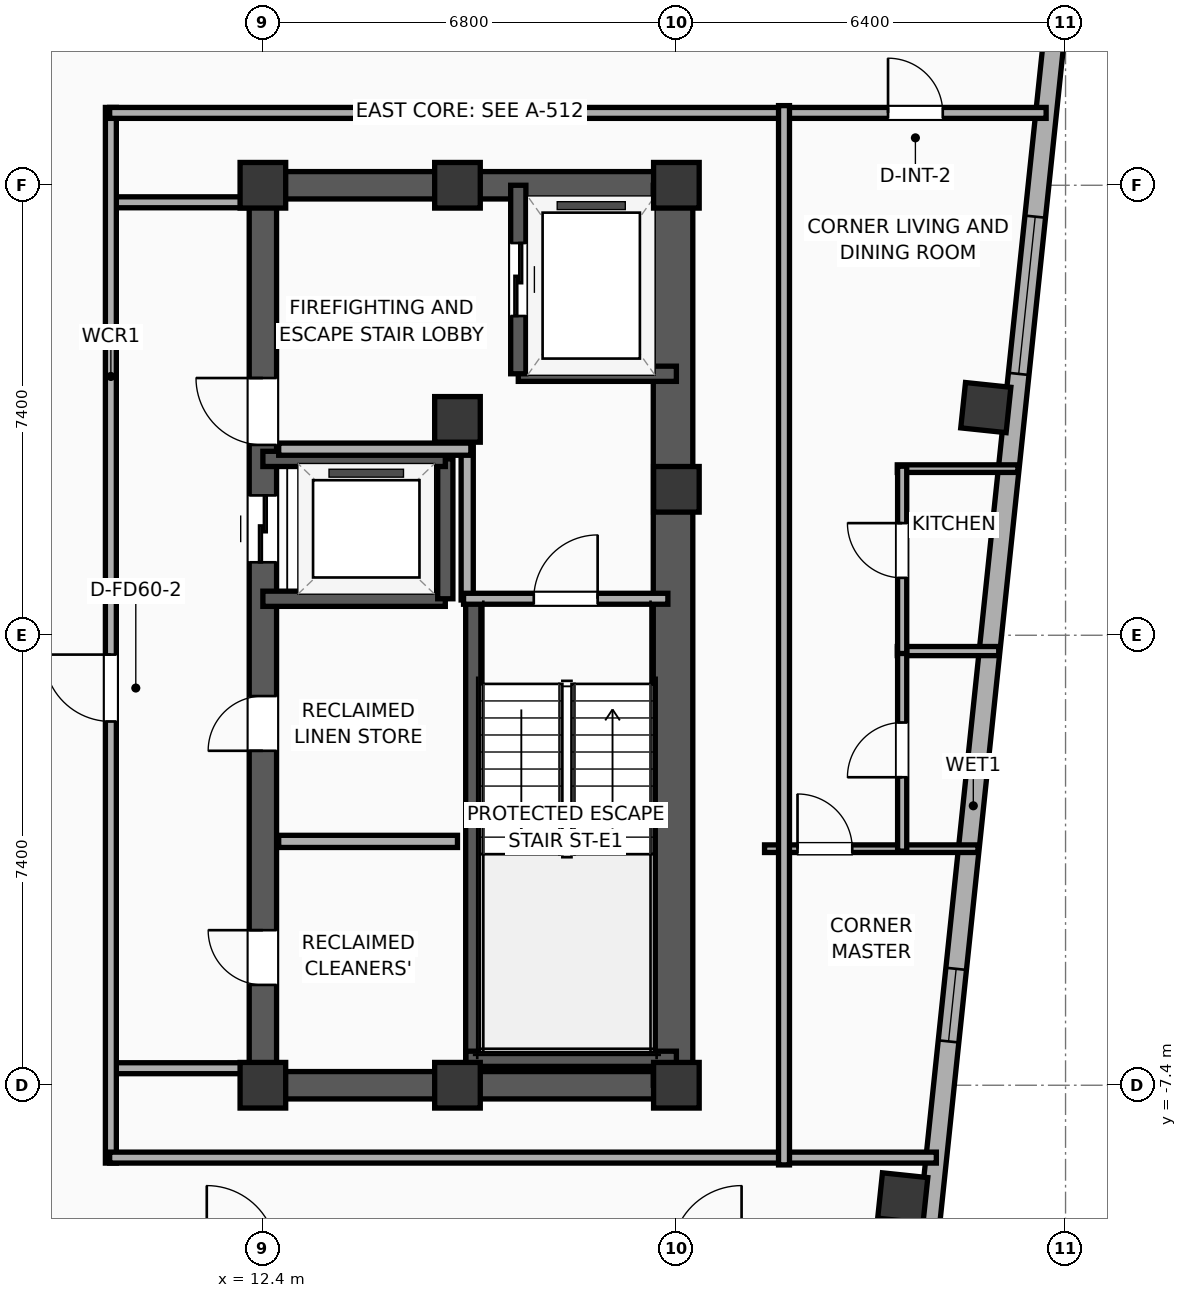
"""IFC4 building model, lengths in metres.
Left out: names, types, materials, properties, quantities, classifications, styles, units other than length and angle.
Written with IfcOpenShell. Run it as: python <this file> out.ifc"""

import sys

from ifc_helpers import new_model, si_unit, direction, frame, frame_2d, origin, origin_2d, place, context, subcontext, project, spatial, rectangle, hollow_rectangle, extrude, element, fill, save


model = new_model("IFC4")
c1 = context("Model", 3, precision=1e-05, world=origin(), true_north=direction((0.0, 1.0)))
c2 = subcontext(c1, "Body", "Model", "MODEL_VIEW")
j1 = project(units=[si_unit("LENGTHUNIT", "METRE"), si_unit("PLANEANGLEUNIT", "RADIAN")], contexts=[c1])
p1 = place(None, origin())
s1 = spatial("IfcSite", under=j1, at=p1, CompositionType="ELEMENT")
p2 = place(p1, origin())
s2 = spatial("IfcBuilding", under=s1, at=p2, CompositionType="ELEMENT")
p3 = place(p2, frame((0.0, 0.0, 295.1)))
s3 = spatial("IfcBuildingStorey", under=s2, at=p3, CompositionType="ELEMENT", Elevation=295.1)
for number, where, z_axis, x_axis in (
    (1, (12.4, -7.4, 0.0), (0.0, 0.0, 1.0), (1.0, 0.0, 0.0)),
    (2, (15.6, 3.55, 0.0), (0.0, 0.0, 1.0), (1.0, 0.0, 0.0)),
    (3, (12.4, 7.4, 0.0), (0.0, 0.0, 1.0), (1.0, 0.0, 0.0)),
    (4, (15.6, -7.4, 0.0), (0.0, 0.0, 1.0), (1.0, 0.0, 0.0)),
    (5, (15.6, 7.4, 0.0), (0.0, 0.0, 1.0), (1.0, 0.0, 0.0)),
    (6, (19.2, -7.4, 0.0), (0.0, 0.0, 1.0), (1.0, 0.0, 0.0)),
    (7, (19.2, 2.4, 0.0), (0.0, 0.0, 1.0), (1.0, 0.0, 0.0)),
    (8, (19.2, 7.4, 0.0), (0.0, 0.0, 1.0), (1.0, 0.0, 0.0)),
):
    element("IfcColumn", number, at=place(p3, frame(where, z_axis=z_axis, x_axis=x_axis)), inside=s3, PredefinedType="COLUMN", context=c2, shape_type="SweptSolid", body=[
        extrude(rectangle(XDim=0.75, YDim=0.75, at=origin_2d()), origin(), (0.0, 0.0, 1.0), 3.9),
    ])
for number, where, z_axis, x_axis in (
    (9, (12.175, -7.4, 0.0), (0.0, 0.0, 1.0), (1.0, 0.0, 0.0)),
    (10, (12.175, 7.4, 0.0), (0.0, 0.0, 1.0), (1.0, 0.0, 0.0)),
):
    element("IfcWall", number, at=place(p3, frame(where, z_axis=z_axis, x_axis=x_axis)), inside=s3, PredefinedType="SHEAR", context=c2, shape_type="SweptSolid", body=[
        extrude(rectangle(XDim=7.25, YDim=0.45, at=frame_2d((3.625, 0.0))), origin(), (0.0, 0.0, 1.0), 3.635),
    ])
p4 = place(p3, frame((12.4, -7.4, 0.0), z_axis=(0.0, 0.0, 1.0), x_axis=(0.0, 1.0, 0.0)))
e11 = element("IfcWall", 11, at=p4, inside=s3, PredefinedType="SHEAR", context=c2, shape_type="SweptSolid", body=[
    extrude(rectangle(XDim=14.8, YDim=0.45, at=frame_2d((7.4, 0.0))), origin(), (0.0, 0.0, 1.0), 3.635),
])
p5 = place(p4, frame((8.6, 0.0, 0.0)))
e12 = element("IfcOpeningElement", 12, at=p5, cuts=e11, PredefinedType="OPENING", context=c2, shape_type="SweptSolid", body=[
    extrude(rectangle(XDim=1.1, YDim=2.05, at=frame_2d((0.55, 1.025))), frame((0.0, 0.235, 0.0), z_axis=(0.0, -1.0, 0.0), x_axis=(1.0, 0.0, 0.0)), (0.0, 0.0, 1.0), 0.47),
])
p6 = place(p4, frame((10.53, 0.0, 0.0)))
e13 = element("IfcOpeningElement", 13, at=p6, cuts=e11, PredefinedType="OPENING", context=c2, shape_type="SweptSolid", body=[
    extrude(rectangle(XDim=1.1, YDim=2.05, at=frame_2d((0.55, 1.025))), frame((0.0, 0.235, 0.0), z_axis=(0.0, -1.0, 0.0), x_axis=(1.0, 0.0, 0.0)), (0.0, 0.0, 1.0), 0.47),
])
p7 = place(p4, frame((1.65, 0.0, 0.0)))
e14 = element("IfcOpeningElement", 14, at=p7, cuts=e11, PredefinedType="OPENING", context=c2, shape_type="SweptSolid", body=[
    extrude(rectangle(XDim=0.9, YDim=2.05, at=frame_2d((0.45, 1.025))), frame((0.0, 0.235, 0.0), z_axis=(0.0, -1.0, 0.0), x_axis=(1.0, 0.0, 0.0)), (0.0, 0.0, 1.0), 0.47),
])
p8 = place(p4, frame((5.5, 0.0, 0.0)))
e15 = element("IfcOpeningElement", 15, at=p8, cuts=e11, PredefinedType="OPENING", context=c2, shape_type="SweptSolid", body=[
    extrude(rectangle(XDim=0.9, YDim=2.05, at=frame_2d((0.45, 1.025))), frame((0.0, 0.235, 0.0), z_axis=(0.0, -1.0, 0.0), x_axis=(1.0, 0.0, 0.0)), (0.0, 0.0, 1.0), 0.47),
])
p9 = place(p3, frame((19.145, -7.4, 0.0), z_axis=(0.0, 0.0, 1.0), x_axis=(0.0, 1.0, 0.0)))
e16 = element("IfcWall", 16, at=p9, inside=s3, PredefinedType="SHEAR", context=c2, shape_type="SweptSolid", body=[
    extrude(rectangle(XDim=14.8, YDim=0.65, at=frame_2d((7.4, 0.0))), origin(), (0.0, 0.0, 1.0), 3.635),
])
p10 = place(p3, frame((15.86, -7.085, 0.0), z_axis=(0.0, 0.0, 1.0), x_axis=(0.0, 1.0, 0.0)))
e17 = element("IfcWall", 17, at=p10, inside=s3, PredefinedType="SOLIDWALL", context=c2, shape_type="SweptSolid", body=[
    extrude(rectangle(XDim=7.685, YDim=0.25, at=frame_2d((3.843, 0.0))), origin(), (0.0, 0.0, 1.0), 3.635),
])
p11 = place(p3, frame((15.74, -6.965, 0.0), z_axis=(0.0, 0.0, 1.0), x_axis=(1.0, 0.0, 0.0)))
e18 = element("IfcWall", 18, at=p11, inside=s3, PredefinedType="SOLIDWALL", context=c2, shape_type="SweptSolid", body=[
    extrude(rectangle(XDim=3.46, YDim=0.25, at=frame_2d((1.73, 0.0))), origin(), (0.0, 0.0, 1.0), 3.635),
])
for number, where, z_axis, x_axis in (
    (19, (22.923, -9.252, 0.0), (0.0, 0.0, 1.0), (0.995, -0.105, 0.0)),
    (20, (24.289, 3.744, 0.0), (0.0, 0.0, 1.0), (0.995, -0.105, 0.0)),
):
    element("IfcColumn", number, at=place(p3, frame(where, z_axis=z_axis, x_axis=x_axis)), inside=s3, PredefinedType="COLUMN", context=c2, shape_type="SweptSolid", body=[
        extrude(hollow_rectangle(XDim=0.75, YDim=0.75, WallThickness=0.025, at=origin_2d()), origin(), (0.0, 0.0, 1.0), 3.9),
    ])
p12 = place(p3, frame((25.67, 12.296, 0.0), z_axis=(0.0, 0.0, 1.0), x_axis=(-0.104533282919, -0.994521388791, 0.0)))
e21 = element("IfcWall", 21, at=p12, inside=s3, PredefinedType="ELEMENTEDWALL", context=c2, shape_type="SweptSolid", body=[
    extrude(rectangle(XDim=30.366, YDim=0.34, at=frame_2d((15.183, 0.0))), origin(), (0.0, 0.0, 1.0), 3.635),
])
p13 = place(p12, frame((5.442, 0.0, 0.65)))
e22 = element("IfcOpeningElement", 22, at=p13, cuts=e21, PredefinedType="OPENING", context=c2, shape_type="SweptSolid", body=[
    extrude(rectangle(XDim=2.6, YDim=2.45, at=frame_2d((1.3, 1.225))), frame((0.0, 0.18, 0.0), z_axis=(0.0, -1.0, 0.0), x_axis=(1.0, 0.0, 0.0)), (0.0, 0.0, 1.0), 0.36),
])
p14 = place(p12, frame((27.067, 0.0, 0.75)))
e23 = element("IfcOpeningElement", 23, at=p14, cuts=e21, PredefinedType="OPENING", context=c2, shape_type="SweptSolid", body=[
    extrude(rectangle(XDim=1.2, YDim=2.05, at=frame_2d((0.6, 1.025))), frame((0.0, 0.18, 0.0), z_axis=(0.0, -1.0, 0.0), x_axis=(1.0, 0.0, 0.0)), (0.0, 0.0, 1.0), 0.36),
])
p15 = place(p12, frame((17.879, 0.0, 0.75)))
e24 = element("IfcOpeningElement", 24, at=p15, cuts=e21, PredefinedType="OPENING", context=c2, shape_type="SweptSolid", body=[
    extrude(rectangle(XDim=1.2, YDim=2.05, at=frame_2d((0.6, 1.025))), frame((0.0, 0.18, 0.0), z_axis=(0.0, -1.0, 0.0), x_axis=(1.0, 0.0, 0.0)), (0.0, 0.0, 1.0), 0.36),
])
p16 = place(p3, frame((16.6, 4.3, 0.0), z_axis=(0.0, 0.0, 1.0), x_axis=(1.0, 0.0, 0.0)))
e25 = element("IfcWall", 25, at=p16, inside=s3, PredefinedType="SOLIDWALL", context=c2, shape_type="SweptSolid", body=[
    extrude(rectangle(XDim=2.6, YDim=0.25, at=frame_2d((1.3, 0.0))), origin(), (0.0, 0.0, 1.0), 3.635),
])
p17 = place(p3, frame((16.6, 7.4, 0.0), z_axis=(0.0, 0.0, 1.0), x_axis=(0.0, -1.0, 0.0)))
e26 = element("IfcWall", 26, at=p17, inside=s3, PredefinedType="SOLIDWALL", context=c2, shape_type="SweptSolid", body=[
    extrude(rectangle(XDim=3.1, YDim=0.25, at=frame_2d((1.55, 0.0))), origin(), (0.0, 0.0, 1.0), 3.635),
])
p18 = place(p17, frame((0.95, 0.0, 0.0)))
e27 = element("IfcOpeningElement", 27, at=p18, cuts=e26, PredefinedType="OPENING", context=c2, shape_type="SweptSolid", body=[
    extrude(rectangle(XDim=1.2, YDim=2.05, at=frame_2d((0.6, 1.025))), frame((0.0, 0.135, 0.0), z_axis=(0.0, -1.0, 0.0), x_axis=(1.0, 0.0, 0.0)), (0.0, 0.0, 1.0), 0.27),
])
p19 = place(p3, frame((12.4, 0.6, 0.0), z_axis=(0.0, 0.0, 1.0), x_axis=(1.0, 0.0, 0.0)))
e28 = element("IfcWall", 28, at=p19, inside=s3, PredefinedType="SOLIDWALL", context=c2, shape_type="SweptSolid", body=[
    extrude(rectangle(XDim=3.0, YDim=0.25, at=frame_2d((1.5, 0.0))), origin(), (0.0, 0.0, 1.0), 3.635),
])
p20 = place(p3, frame((15.4, 0.6, 0.0), z_axis=(0.0, 0.0, 1.0), x_axis=(0.0, 1.0, 0.0)))
e29 = element("IfcWall", 29, at=p20, inside=s3, PredefinedType="SOLIDWALL", context=c2, shape_type="SweptSolid", body=[
    extrude(rectangle(XDim=2.3, YDim=0.25, at=frame_2d((1.15, 0.0))), origin(), (0.0, 0.0, 1.0), 3.635),
])
p21 = place(p3, frame((15.4, 2.9, 0.0), z_axis=(0.0, 0.0, 1.0), x_axis=(-1.0, 0.0, 0.0)))
e30 = element("IfcWall", 30, at=p21, inside=s3, PredefinedType="SOLIDWALL", context=c2, shape_type="SweptSolid", body=[
    extrude(rectangle(XDim=3.0, YDim=0.25, at=frame_2d((1.5, 0.0))), origin(), (0.0, 0.0, 1.0), 3.635),
])
p22 = place(p3, frame((15.76, 0.58, 0.0), z_axis=(0.0, 0.0, 1.0), x_axis=(0.0, 1.0, 0.0)))
e31 = element("IfcWall", 31, at=p22, inside=s3, PredefinedType="PARTITIONING", context=c2, shape_type="SweptSolid", body=[
    extrude(rectangle(XDim=2.52, YDim=0.2, at=frame_2d((1.26, 0.0))), origin(), (0.0, 0.0, 1.0), 3.635),
])
p23 = place(p3, frame((12.66, 3.06, 0.0), z_axis=(0.0, 0.0, 1.0), x_axis=(1.0, 0.0, 0.0)))
e32 = element("IfcWall", 32, at=p23, inside=s3, PredefinedType="PARTITIONING", context=c2, shape_type="SweptSolid", body=[
    extrude(rectangle(XDim=3.16, YDim=0.2, at=frame_2d((1.58, 0.0))), origin(), (0.0, 0.0, 1.0), 3.635),
])
p24 = place(p3, frame((15.7, 0.6, 0.0), z_axis=(0.0, 0.0, 1.0), x_axis=(1.0, 0.0, 0.0)))
e33 = element("IfcWall", 33, at=p24, inside=s3, PredefinedType="PARTITIONING", context=c2, shape_type="SweptSolid", body=[
    extrude(rectangle(XDim=3.36, YDim=0.18, at=frame_2d((1.68, 0.0))), origin(), (0.0, 0.0, 1.0), 3.635),
])
p25 = place(p24, frame((1.155, 0.0, 0.0)))
e34 = element("IfcOpeningElement", 34, at=p25, cuts=e33, PredefinedType="OPENING", context=c2, shape_type="SweptSolid", body=[
    extrude(rectangle(XDim=1.05, YDim=2.05, at=frame_2d((0.525, 1.025))), frame((0.0, 0.1, 0.0), z_axis=(0.0, -1.0, 0.0), x_axis=(1.0, 0.0, 0.0)), (0.0, 0.0, 1.0), 0.2),
])
p26 = place(p3, frame((12.66, -3.39, 0.0), z_axis=(0.0, 0.0, 1.0), x_axis=(1.0, 0.0, 0.0)))
e35 = element("IfcWall", 35, at=p26, inside=s3, PredefinedType="PARTITIONING", context=c2, shape_type="SweptSolid", body=[
    extrude(rectangle(XDim=2.94, YDim=0.2, at=frame_2d((1.47, 0.0))), origin(), (0.0, 0.0, 1.0), 3.635),
])
for number, where, z_axis, x_axis in (
    (36, (9.88, 7.12, 0.0), (0.0, 0.0, 1.0), (1.0, 0.0, 0.0)),
    (37, (9.88, -7.12, 0.0), (0.0, 0.0, 1.0), (1.0, 0.0, 0.0)),
):
    element("IfcWall", number, at=place(p3, frame(where, z_axis=z_axis, x_axis=x_axis)), inside=s3, PredefinedType="PARTITIONING", context=c2, shape_type="SweptSolid", body=[
        extrude(rectangle(XDim=2.27, YDim=0.18, at=frame_2d((1.135, 0.0))), origin(), (0.0, 0.0, 1.0), 3.635),
    ])
p27 = place(p3, frame((9.9, -8.68, 0.0), z_axis=(0.0, 0.0, 1.0), x_axis=(0.0, 1.0, 0.0)))
e38 = element("IfcWall", 38, at=p27, inside=s3, PredefinedType="PARTITIONING", context=c2, shape_type="SweptSolid", body=[
    extrude(rectangle(XDim=17.36, YDim=0.18, at=frame_2d((8.68, 0.0))), origin(), (0.0, 0.0, 1.0), 3.635),
])
p28 = place(p27, frame((7.262, 0.0, 0.0)))
e39 = element("IfcOpeningElement", 39, at=p28, cuts=e38, PredefinedType="OPENING", context=c2, shape_type="SweptSolid", body=[
    extrude(rectangle(XDim=1.1, YDim=2.05, at=frame_2d((0.55, 1.025))), frame((0.0, 0.1, 0.0), z_axis=(0.0, -1.0, 0.0), x_axis=(1.0, 0.0, 0.0)), (0.0, 0.0, 1.0), 0.2),
])
p29 = place(p3, frame((9.88, 8.59, 0.0), z_axis=(0.0, 0.0, 1.0), x_axis=(1.0, 0.0, 0.0)))
e40 = element("IfcWall", 40, at=p29, inside=s3, PredefinedType="PARTITIONING", context=c2, shape_type="SweptSolid", body=[
    extrude(rectangle(XDim=15.401, YDim=0.18, at=frame_2d((7.7, 0.0))), origin(), (0.0, 0.0, 1.0), 3.635),
])
p30 = place(p29, frame((12.801, 0.0, 0.0)))
e41 = element("IfcOpeningElement", 41, at=p30, cuts=e40, PredefinedType="OPENING", context=c2, shape_type="SweptSolid", body=[
    extrude(rectangle(XDim=0.9, YDim=2.05, at=frame_2d((0.45, 1.025))), frame((0.0, 0.1, 0.0), z_axis=(0.0, -1.0, 0.0), x_axis=(1.0, 0.0, 0.0)), (0.0, 0.0, 1.0), 0.2),
])
p31 = place(p3, frame((9.88, -8.59, 0.0), z_axis=(0.0, 0.0, 1.0), x_axis=(1.0, 0.0, 0.0)))
e42 = element("IfcWall", 42, at=p31, inside=s3, PredefinedType="PARTITIONING", context=c2, shape_type="SweptSolid", body=[
    extrude(rectangle(XDim=13.595, YDim=0.18, at=frame_2d((6.797, 0.0))), origin(), (0.0, 0.0, 1.0), 3.635),
])
p32 = place(p3, frame((22.833, 2.74, 0.0), z_axis=(0.0, 0.0, 1.0), x_axis=(1.0, 0.0, 0.0)))
e43 = element("IfcWall", 43, at=p32, inside=s3, PredefinedType="PARTITIONING", context=c2, shape_type="SweptSolid", body=[
    extrude(rectangle(XDim=1.984, YDim=0.125, at=frame_2d((0.992, 0.0))), origin(), (0.0, 0.0, 1.0), 3.635),
])
p33 = place(p3, frame((22.833, -0.26, 0.0), z_axis=(0.0, 0.0, 1.0), x_axis=(1.0, 0.0, 0.0)))
e44 = element("IfcWall", 44, at=p33, inside=s3, PredefinedType="PLUMBINGWALL", context=c2, shape_type="SweptSolid", body=[
    extrude(rectangle(XDim=1.668, YDim=0.15, at=frame_2d((0.834, 0.0))), origin(), (0.0, 0.0, 1.0), 3.635),
])
p34 = place(p3, frame((20.65, -3.51, 0.0), z_axis=(0.0, 0.0, 1.0), x_axis=(1.0, 0.0, 0.0)))
e45 = element("IfcWall", 45, at=p34, inside=s3, PredefinedType="PARTITIONING", context=c2, shape_type="SweptSolid", body=[
    extrude(rectangle(XDim=3.51, YDim=0.125, at=frame_2d((1.755, 0.0))), origin(), (0.0, 0.0, 1.0), 3.635),
])
p35 = place(p34, frame((0.542, 0.0, 0.0)))
e46 = element("IfcOpeningElement", 46, at=p35, cuts=e45, PredefinedType="OPENING", context=c2, shape_type="SweptSolid", body=[
    extrude(rectangle(XDim=0.9, YDim=2.05, at=frame_2d((0.45, 1.025))), frame((0.0, 0.073, 0.0), z_axis=(0.0, -1.0, 0.0), x_axis=(1.0, 0.0, 0.0)), (0.0, 0.0, 1.0), 0.145),
])
p36 = place(p3, frame((22.913, -3.55, 0.0), z_axis=(0.0, 0.0, 1.0), x_axis=(0.0, 1.0, 0.0)))
e47 = element("IfcWall", 47, at=p36, inside=s3, PredefinedType="PLUMBINGWALL", context=c2, shape_type="SweptSolid", body=[
    extrude(rectangle(XDim=3.33, YDim=0.15, at=frame_2d((1.665, 0.0))), origin(), (0.0, 0.0, 1.0), 3.635),
])
p37 = place(p36, frame((1.215, 0.0, 0.0)))
e48 = element("IfcOpeningElement", 48, at=p37, cuts=e47, PredefinedType="OPENING", context=c2, shape_type="SweptSolid", body=[
    extrude(rectangle(XDim=0.9, YDim=2.05, at=frame_2d((0.45, 1.025))), frame((0.0, 0.085, 0.0), z_axis=(0.0, -1.0, 0.0), x_axis=(1.0, 0.0, 0.0)), (0.0, 0.0, 1.0), 0.17),
])
p38 = place(p3, frame((22.913, -0.3, 0.0), z_axis=(0.0, 0.0, 1.0), x_axis=(0.0, 1.0, 0.0)))
e49 = element("IfcWall", 49, at=p38, inside=s3, PredefinedType="PLUMBINGWALL", context=c2, shape_type="SweptSolid", body=[
    extrude(rectangle(XDim=3.08, YDim=0.15, at=frame_2d((1.54, 0.0))), origin(), (0.0, 0.0, 1.0), 3.635),
])
p39 = place(p38, frame((1.244, 0.0, 0.0)))
e50 = element("IfcOpeningElement", 50, at=p39, cuts=e49, PredefinedType="OPENING", context=c2, shape_type="SweptSolid", body=[
    extrude(rectangle(XDim=0.9, YDim=2.05, at=frame_2d((0.45, 1.025))), frame((0.0, 0.085, 0.0), z_axis=(0.0, -1.0, 0.0), x_axis=(1.0, 0.0, 0.0)), (0.0, 0.0, 1.0), 0.17),
])
p40 = place(p3, frame((20.97, -8.71, 0.0), z_axis=(0.0, 0.0, 1.0), x_axis=(0.0, 1.0, 0.0)))
e51 = element("IfcWall", 51, at=p40, inside=s3, PredefinedType="PARTITIONING", context=c2, shape_type="SweptSolid", body=[
    extrude(rectangle(XDim=17.42, YDim=0.18, at=frame_2d((8.71, 0.0))), origin(), (0.0, 0.0, 1.0), 3.635),
])
p41 = place(p13, origin())
e52 = element("IfcWindow", 52, at=p41, inside=s3, PartitioningType="SINGLE_PANEL", PredefinedType="WINDOW", context=c2, shape_type="SweptSolid", body=[
    extrude(rectangle(XDim=2.6, YDim=2.45, at=frame_2d((1.3, 1.225))), frame((0.0, 0.03, 0.0), z_axis=(0.0, -1.0, 0.0), x_axis=(1.0, 0.0, 0.0)), (0.0, 0.0, 1.0), 0.06),
])
fill(e22, e52)
p42 = place(p15, origin())
e53 = element("IfcWindow", 53, at=p42, inside=s3, PartitioningType="SINGLE_PANEL", PredefinedType="WINDOW", context=c2, shape_type="SweptSolid", body=[
    extrude(rectangle(XDim=1.2, YDim=2.05, at=frame_2d((0.6, 1.025))), frame((0.0, 0.03, 0.0), z_axis=(0.0, -1.0, 0.0), x_axis=(1.0, 0.0, 0.0)), (0.0, 0.0, 1.0), 0.06),
])
fill(e24, e53)
p43 = place(p18, origin())
e54 = element("IfcDoor", 54, at=p43, inside=s3, OperationType="SLIDING_TO_LEFT", PredefinedType="DOOR", context=c2, shape_type="SweptSolid", body=[
    extrude(rectangle(XDim=1.2, YDim=2.05, at=frame_2d((0.6, 1.025))), frame((0.0, 0.025, 0.0), z_axis=(0.0, -1.0, 0.0), x_axis=(1.0, 0.0, 0.0)), (0.0, 0.0, 1.0), 0.05),
])
fill(e27, e54)
p44 = place(p5, origin())
e55 = element("IfcDoor", 55, at=p44, inside=s3, OperationType="SLIDING_TO_LEFT", PredefinedType="DOOR", context=c2, shape_type="SweptSolid", body=[
    extrude(rectangle(XDim=1.1, YDim=2.05, at=frame_2d((0.55, 1.025))), frame((0.0, 0.025, 0.0), z_axis=(0.0, -1.0, 0.0), x_axis=(1.0, 0.0, 0.0)), (0.0, 0.0, 1.0), 0.05),
])
fill(e12, e55)
p45 = place(p25, origin())
e56 = element("IfcDoor", 56, at=p45, inside=s3, OperationType="SINGLE_SWING_RIGHT", PredefinedType="DOOR", context=c2, shape_type="SweptSolid", body=[
    extrude(rectangle(XDim=1.05, YDim=2.05, at=frame_2d((0.525, 1.025))), frame((0.0, 0.025, 0.0), z_axis=(0.0, -1.0, 0.0), x_axis=(1.0, 0.0, 0.0)), (0.0, 0.0, 1.0), 0.05),
])
fill(e34, e56)
p46 = place(p28, origin())
e57 = element("IfcDoor", 57, at=p46, inside=s3, OperationType="SINGLE_SWING_RIGHT", PredefinedType="DOOR", context=c2, shape_type="SweptSolid", body=[
    extrude(rectangle(XDim=1.1, YDim=2.05, at=frame_2d((0.55, 1.025))), frame((0.0, 0.025, 0.0), z_axis=(0.0, -1.0, 0.0), x_axis=(1.0, 0.0, 0.0)), (0.0, 0.0, 1.0), 0.05),
])
fill(e39, e57)
p47 = place(p30, origin())
e58 = element("IfcDoor", 58, at=p47, inside=s3, OperationType="SINGLE_SWING_LEFT", PredefinedType="DOOR", context=c2, shape_type="SweptSolid", body=[
    extrude(rectangle(XDim=0.9, YDim=2.05, at=frame_2d((0.45, 1.025))), frame((0.0, 0.025, 0.0), z_axis=(0.0, -1.0, 0.0), x_axis=(1.0, 0.0, 0.0)), (0.0, 0.0, 1.0), 0.05),
])
fill(e41, e58)
p48 = place(p35, origin())
e59 = element("IfcDoor", 59, at=p48, inside=s3, OperationType="SINGLE_SWING_LEFT", PredefinedType="DOOR", context=c2, shape_type="SweptSolid", body=[
    extrude(rectangle(XDim=0.9, YDim=2.05, at=frame_2d((0.45, 1.025))), frame((0.0, 0.025, 0.0), z_axis=(0.0, -1.0, 0.0), x_axis=(1.0, 0.0, 0.0)), (0.0, 0.0, 1.0), 0.05),
])
fill(e46, e59)
p49 = place(p37, origin())
e60 = element("IfcDoor", 60, at=p49, inside=s3, OperationType="SINGLE_SWING_LEFT", PredefinedType="DOOR", context=c2, shape_type="SweptSolid", body=[
    extrude(rectangle(XDim=0.9, YDim=2.05, at=frame_2d((0.45, 1.025))), frame((0.0, 0.025, 0.0), z_axis=(0.0, -1.0, 0.0), x_axis=(1.0, 0.0, 0.0)), (0.0, 0.0, 1.0), 0.05),
])
fill(e48, e60)
p50 = place(p39, origin())
e61 = element("IfcDoor", 61, at=p50, inside=s3, OperationType="SINGLE_SWING_RIGHT", PredefinedType="DOOR", context=c2, shape_type="SweptSolid", body=[
    extrude(rectangle(XDim=0.9, YDim=2.05, at=frame_2d((0.45, 1.025))), frame((0.0, 0.025, 0.0), z_axis=(0.0, -1.0, 0.0), x_axis=(1.0, 0.0, 0.0)), (0.0, 0.0, 1.0), 0.05),
])
fill(e50, e61)
p51 = place(p6, origin())
e62 = element("IfcDoor", 62, at=p51, inside=s3, OperationType="SINGLE_SWING_RIGHT", PredefinedType="DOOR", context=c2, shape_type="SweptSolid", body=[
    extrude(rectangle(XDim=1.1, YDim=2.05, at=frame_2d((0.55, 1.025))), frame((0.0, 0.025, 0.0), z_axis=(0.0, -1.0, 0.0), x_axis=(1.0, 0.0, 0.0)), (0.0, 0.0, 1.0), 0.05),
])
fill(e13, e62)
p52 = place(p7, origin())
e63 = element("IfcDoor", 63, at=p52, inside=s3, OperationType="SINGLE_SWING_RIGHT", PredefinedType="DOOR", context=c2, shape_type="SweptSolid", body=[
    extrude(rectangle(XDim=0.9, YDim=2.05, at=frame_2d((0.45, 1.025))), frame((0.0, 0.025, 0.0), z_axis=(0.0, -1.0, 0.0), x_axis=(1.0, 0.0, 0.0)), (0.0, 0.0, 1.0), 0.05),
])
fill(e14, e63)
p53 = place(p8, origin())
e64 = element("IfcDoor", 64, at=p53, inside=s3, OperationType="SINGLE_SWING_LEFT", PredefinedType="DOOR", context=c2, shape_type="SweptSolid", body=[
    extrude(rectangle(XDim=0.9, YDim=2.05, at=frame_2d((0.45, 1.025))), frame((0.0, 0.025, 0.0), z_axis=(0.0, -1.0, 0.0), x_axis=(1.0, 0.0, 0.0)), (0.0, 0.0, 1.0), 0.05),
])
fill(e15, e64)
save(model, sys.argv[1])
